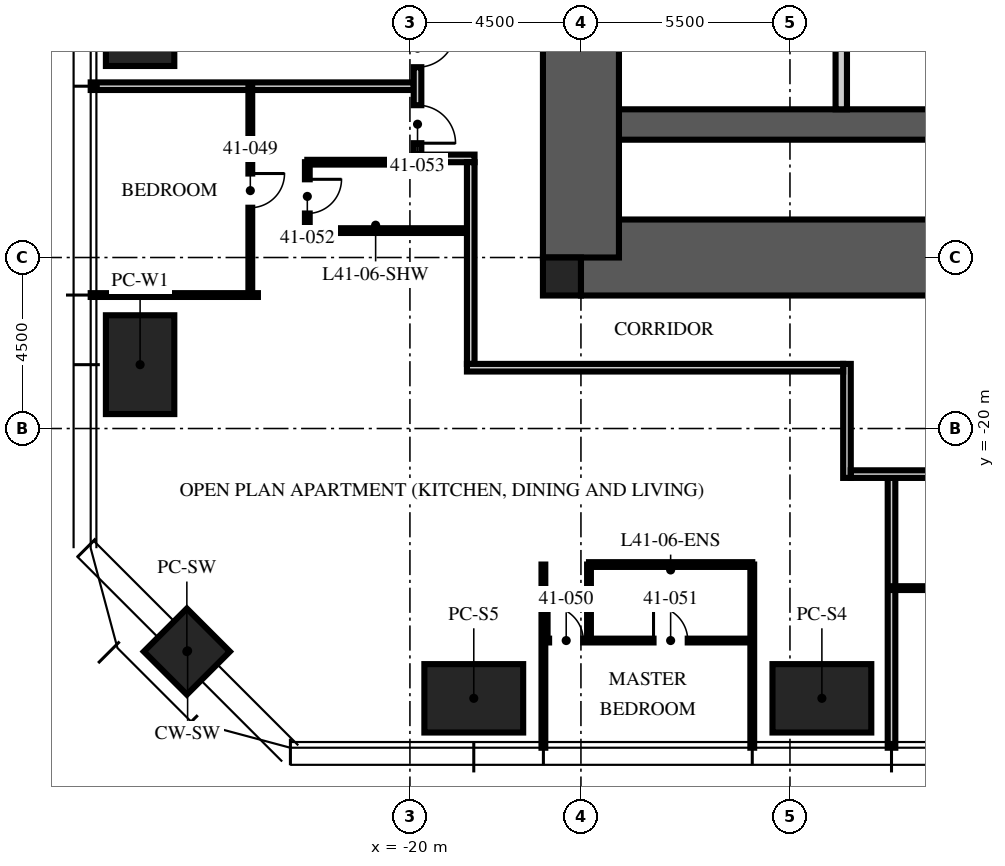
"""IFC4 building model, lengths in metres.
Left out: names, types, materials, properties, quantities, classifications, styles, units other than length and angle.
Written with IfcOpenShell. Run it as: python <this file> out.ifc"""

import sys

from ifc_helpers import new_model, si_unit, direction, frame, frame_2d, origin, origin_2d, place, context, subcontext, project, spatial, rectangle, extrude, element, fill, save


model = new_model("IFC4")
c1 = context("Model", 3, precision=1e-05, world=origin(), true_north=direction((0.0, 1.0)))
c2 = subcontext(c1, "Body", "Model", "MODEL_VIEW")
j1 = project(units=[si_unit("LENGTHUNIT", "METRE"), si_unit("PLANEANGLEUNIT", "RADIAN")], contexts=[c1])
p1 = place(None, origin())
s1 = spatial("IfcSite", under=j1, at=p1, CompositionType="ELEMENT")
p2 = place(p1, origin())
s2 = spatial("IfcBuilding", under=s1, at=p2, CompositionType="ELEMENT")
p3 = place(p2, frame((0.0, 0.0, 163.5)))
s3 = spatial("IfcBuildingStorey", under=s2, at=p3, CompositionType="ELEMENT", Elevation=163.5)
p4 = place(p3, frame((-15.5, -15.5, -0.25), z_axis=(0.0, 0.0, 1.0), x_axis=(1.0, 0.0, 0.0)))
e1 = element("IfcWall", 1, at=p4, inside=s3, PredefinedType="SHEAR", context=c2, shape_type="SweptSolid", body=[
    extrude(rectangle(XDim=31.0, YDim=2.0, at=frame_2d((15.5, 0.0))), origin(), (0.0, 0.0, 1.0), 3.75),
])
p5 = place(p4, frame((10.4, 0.0, 0.25)))
e2 = element("IfcOpeningElement", 2, at=p5, cuts=e1, PredefinedType="OPENING", context=c2, shape_type="SweptSolid", body=[
    extrude(rectangle(XDim=1.1, YDim=2.1, at=frame_2d((0.55, 1.05))), frame((0.0, 1.01, 0.0), z_axis=(0.0, -1.0, 0.0), x_axis=(1.0, 0.0, 0.0)), (0.0, 0.0, 1.0), 2.02),
])
p6 = place(p4, frame((13.5, 0.0, 0.25)))
e3 = element("IfcOpeningElement", 3, at=p6, cuts=e1, PredefinedType="OPENING", context=c2, shape_type="SweptSolid", body=[
    extrude(rectangle(XDim=1.1, YDim=2.1, at=frame_2d((0.55, 1.05))), frame((0.0, 1.01, 0.0), z_axis=(0.0, -1.0, 0.0), x_axis=(1.0, 0.0, 0.0)), (0.0, 0.0, 1.0), 2.02),
])
p7 = place(p4, frame((16.6, 0.0, 0.25)))
e4 = element("IfcOpeningElement", 4, at=p7, cuts=e1, PredefinedType="OPENING", context=c2, shape_type="SweptSolid", body=[
    extrude(rectangle(XDim=1.1, YDim=2.1, at=frame_2d((0.55, 1.05))), frame((0.0, 1.01, 0.0), z_axis=(0.0, -1.0, 0.0), x_axis=(1.0, 0.0, 0.0)), (0.0, 0.0, 1.0), 2.02),
])
p8 = place(p3, frame((-15.5, -12.0, -0.25), z_axis=(0.0, 0.0, 1.0), x_axis=(1.0, 0.0, 0.0)))
e5 = element("IfcWall", 5, at=p8, inside=s3, PredefinedType="SHEAR", context=c2, shape_type="SweptSolid", body=[
    extrude(rectangle(XDim=31.0, YDim=0.8, at=frame_2d((15.5, 0.0))), origin(), (0.0, 0.0, 1.0), 3.75),
])
p9 = place(p3, frame((-15.5, -15.5, -0.25), z_axis=(0.0, 0.0, 1.0), x_axis=(0.0, 1.0, 0.0)))
e6 = element("IfcWall", 6, at=p9, inside=s3, PredefinedType="SHEAR", context=c2, shape_type="SweptSolid", body=[
    extrude(rectangle(XDim=31.0, YDim=2.0, at=frame_2d((15.5, 0.0))), origin(), (0.0, 0.0, 1.0), 3.75),
])
p10 = place(p9, frame((6.5, 0.0, 0.25)))
e7 = element("IfcOpeningElement", 7, at=p10, cuts=e6, PredefinedType="OPENING", context=c2, shape_type="SweptSolid", body=[
    extrude(rectangle(XDim=1.2, YDim=2.1, at=frame_2d((0.6, 1.05))), frame((0.0, 1.01, 0.0), z_axis=(0.0, -1.0, 0.0), x_axis=(1.0, 0.0, 0.0)), (0.0, 0.0, 1.0), 2.02),
])
p11 = place(p9, frame((23.0, 0.0, 0.25)))
e8 = element("IfcOpeningElement", 8, at=p11, cuts=e6, PredefinedType="OPENING", context=c2, shape_type="SweptSolid", body=[
    extrude(rectangle(XDim=1.8, YDim=2.1, at=frame_2d((0.9, 1.05))), frame((0.0, 1.01, 0.0), z_axis=(0.0, -1.0, 0.0), x_axis=(1.0, 0.0, 0.0)), (0.0, 0.0, 1.0), 2.02),
])
p12 = place(p3, frame((-16.0, -16.0, -0.25), z_axis=(0.0, 0.0, 1.0), x_axis=(1.0, 0.0, 0.0)))
e9 = element("IfcColumn", 9, at=p12, inside=s3, PredefinedType="COLUMN", context=c2, shape_type="SweptSolid", body=[
    extrude(rectangle(XDim=1.0, YDim=1.0, at=origin_2d()), origin(), (0.0, 0.0, 1.0), 3.75),
])
for number, where, z_axis, x_axis in (
    (10, (-9.16, -27.1, 0.0), (0.0, 0.0, 1.0), (1.0, 0.0, 0.0)),
    (11, (-18.32, -27.1, 0.0), (0.0, 0.0, 1.0), (1.0, 0.0, 0.0)),
    (12, (-27.1, -18.32, 0.0), (0.0, 0.0, 1.0), (0.0, 1.0, 0.0)),
    (13, (-27.1, -9.16, 0.0), (0.0, 0.0, 1.0), (0.0, 1.0, 0.0)),
):
    element("IfcColumn", number, at=place(p3, frame(where, z_axis=z_axis, x_axis=x_axis)), inside=s3, PredefinedType="COLUMN", context=c2, shape_type="SweptSolid", body=[
        extrude(rectangle(XDim=2.6, YDim=1.8, at=origin_2d()), origin(), (0.0, 0.0, 1.0), 3.75),
    ])
p13 = place(p3, frame((-25.87, -25.87, 0.0), z_axis=(0.0, 0.0, 1.0), x_axis=(0.707106781187, -0.707106781187, 0.0)))
e14 = element("IfcColumn", 14, at=p13, inside=s3, PredefinedType="COLUMN", context=c2, shape_type="SweptSolid", body=[
    extrude(rectangle(XDim=1.6, YDim=1.6, at=origin_2d()), origin(), (0.0, 0.0, 1.0), 3.75),
])
p14 = place(p3, frame((-8.65, -11.6, 0.0), z_axis=(0.0, 0.0, 1.0), x_axis=(0.0, 1.0, 0.0)))
e15 = element("IfcWall", 15, at=p14, inside=s3, PredefinedType="PARTITIONING", context=c2, shape_type="SweptSolid", body=[
    extrude(rectangle(XDim=6.7, YDim=0.3, at=frame_2d((3.35, 0.0))), origin(), (0.0, 0.0, 1.0), 3.5),
])
p15 = place(p14, frame((2.85, 0.0, 0.0)))
e16 = element("IfcOpeningElement", 16, at=p15, cuts=e15, PredefinedType="OPENING", context=c2, shape_type="SweptSolid", body=[
    extrude(rectangle(XDim=1.1, YDim=2.1, at=frame_2d((0.55, 1.05))), frame((0.0, 0.16, 0.0), z_axis=(0.0, -1.0, 0.0), x_axis=(1.0, 0.0, 0.0)), (0.0, 0.0, 1.0), 0.32),
])
p16 = place(p3, frame((-19.9, -10.992, 0.0), z_axis=(0.0, 0.0, 1.0), x_axis=(-1.0, 0.0, 0.0)))
e17 = element("IfcWall", 17, at=p16, inside=s3, PredefinedType="PARTITIONING", context=c2, shape_type="SweptSolid", body=[
    extrude(rectangle(XDim=8.5, YDim=0.2, at=frame_2d((4.25, 0.0))), origin(), (0.0, 0.0, 1.0), 2.81),
])
p17 = place(p3, frame((-24.0, -16.488, 0.0), z_axis=(0.0, 0.0, 1.0), x_axis=(-1.0, 0.0, 0.0)))
e18 = element("IfcWall", 18, at=p17, inside=s3, PredefinedType="PARTITIONING", context=c2, shape_type="SweptSolid", body=[
    extrude(rectangle(XDim=4.4, YDim=0.1, at=frame_2d((2.2, 0.0))), origin(), (0.0, 0.0, 1.0), 2.81),
])
for number, where, z_axis, x_axis in (
    (19, (-16.488, -23.58, 0.0), (0.0, 0.0, 1.0), (0.0, -1.0, 0.0)),
    (20, (-10.992, -23.58, 0.0), (0.0, 0.0, 1.0), (0.0, -1.0, 0.0)),
):
    element("IfcWall", number, at=place(p3, frame(where, z_axis=z_axis, x_axis=x_axis)), inside=s3, PredefinedType="PARTITIONING", context=c2, shape_type="SweptSolid", body=[
        extrude(rectangle(XDim=4.82, YDim=0.1, at=frame_2d((2.41, 0.0))), origin(), (0.0, 0.0, 1.0), 2.81),
    ])
p18 = place(p3, frame((-7.328, -21.3, 0.0), z_axis=(0.0, 0.0, 1.0), x_axis=(0.0, -1.0, 0.0)))
e21 = element("IfcWall", 21, at=p18, inside=s3, PredefinedType="PARTITIONING", context=c2, shape_type="SweptSolid", body=[
    extrude(rectangle(XDim=7.1, YDim=0.2, at=frame_2d((3.55, 0.0))), origin(), (0.0, 0.0, 1.0), 2.81),
])
p19 = place(p3, frame((-24.2, -10.992, 0.0), z_axis=(0.0, 0.0, 1.0), x_axis=(0.0, -1.0, 0.0)))
e22 = element("IfcWall", 22, at=p19, inside=s3, PredefinedType="PARTITIONING", context=c2, shape_type="SweptSolid", body=[
    extrude(rectangle(XDim=5.496, YDim=0.1, at=frame_2d((2.748, 0.0))), origin(), (0.0, 0.0, 1.0), 2.81),
])
p20 = place(p19, frame((2.298, 0.0, 0.0)))
e23 = element("IfcOpeningElement", 23, at=p20, cuts=e22, PredefinedType="OPENING", context=c2, shape_type="SweptSolid", body=[
    extrude(rectangle(XDim=0.9, YDim=2.1, at=frame_2d((0.45, 1.05))), frame((0.0, 0.06, 0.0), z_axis=(0.0, -1.0, 0.0), x_axis=(1.0, 0.0, 0.0)), (0.0, 0.0, 1.0), 0.12),
])
p21 = place(p3, frame((-16.488, -25.58, 0.0), z_axis=(0.0, 0.0, 1.0), x_axis=(1.0, 0.0, 0.0)))
e24 = element("IfcWall", 24, at=p21, inside=s3, PredefinedType="PARTITIONING", context=c2, shape_type="SweptSolid", body=[
    extrude(rectangle(XDim=5.496, YDim=0.1, at=frame_2d((2.748, 0.0))), origin(), (0.0, 0.0, 1.0), 2.81),
])
p22 = place(p21, frame((0.15, 0.0, 0.0)))
e25 = element("IfcOpeningElement", 25, at=p22, cuts=e24, PredefinedType="OPENING", context=c2, shape_type="SweptSolid", body=[
    extrude(rectangle(XDim=0.9, YDim=2.1, at=frame_2d((0.45, 1.05))), frame((0.0, 0.06, 0.0), z_axis=(0.0, -1.0, 0.0), x_axis=(1.0, 0.0, 0.0)), (0.0, 0.0, 1.0), 0.12),
])
p23 = place(p21, frame((2.898, 0.0, 0.0)))
e26 = element("IfcOpeningElement", 26, at=p23, cuts=e24, PredefinedType="OPENING", context=c2, shape_type="SweptSolid", body=[
    extrude(rectangle(XDim=0.9, YDim=2.1, at=frame_2d((0.45, 1.05))), frame((0.0, 0.06, 0.0), z_axis=(0.0, -1.0, 0.0), x_axis=(1.0, 0.0, 0.0)), (0.0, 0.0, 1.0), 0.12),
])
p24 = place(p3, frame((-15.288, -23.58, 0.0), z_axis=(0.0, 0.0, 1.0), x_axis=(0.0, -1.0, 0.0)))
e27 = element("IfcWall", 27, at=p24, inside=s3, PredefinedType="PARTITIONING", context=c2, shape_type="SweptSolid", body=[
    extrude(rectangle(XDim=2.0, YDim=0.1, at=frame_2d((1.0, 0.0))), origin(), (0.0, 0.0, 1.0), 3.5),
])
p25 = place(p3, frame((-15.288, -23.58, 0.0), z_axis=(0.0, 0.0, 1.0), x_axis=(1.0, 0.0, 0.0)))
e28 = element("IfcWall", 28, at=p25, inside=s3, PredefinedType="PARTITIONING", context=c2, shape_type="SweptSolid", body=[
    extrude(rectangle(XDim=4.296, YDim=0.125, at=frame_2d((2.148, 0.0))), origin(), (0.0, 0.0, 1.0), 2.81),
])
p26 = place(p3, frame((-22.7, -12.992, 0.0), z_axis=(0.0, 0.0, 1.0), x_axis=(0.0, -1.0, 0.0)))
e29 = element("IfcWall", 29, at=p26, inside=s3, PredefinedType="PARTITIONING", context=c2, shape_type="SweptSolid", body=[
    extrude(rectangle(XDim=1.8, YDim=0.125, at=frame_2d((0.9, 0.0))), origin(), (0.0, 0.0, 1.0), 2.81),
])
p27 = place(p26, frame((0.45, 0.0, 0.0)))
e30 = element("IfcOpeningElement", 30, at=p27, cuts=e29, PredefinedType="OPENING", context=c2, shape_type="SweptSolid", body=[
    extrude(rectangle(XDim=0.9, YDim=2.1, at=frame_2d((0.45, 1.05))), frame((0.0, 0.073, 0.0), z_axis=(0.0, -1.0, 0.0), x_axis=(1.0, 0.0, 0.0)), (0.0, 0.0, 1.0), 0.145),
])
p28 = place(p3, frame((-19.97, -12.992, 0.0), z_axis=(0.0, 0.0, 1.0), x_axis=(-1.0, 0.0, 0.0)))
e31 = element("IfcWall", 31, at=p28, inside=s3, PredefinedType="PARTITIONING", context=c2, shape_type="SweptSolid", body=[
    extrude(rectangle(XDim=2.73, YDim=0.125, at=frame_2d((1.365, 0.0))), origin(), (0.0, 0.0, 1.0), 3.5),
])
p29 = place(p3, frame((-18.5, -14.792, 0.0), z_axis=(0.0, 0.0, 1.0), x_axis=(-1.0, 0.0, 0.0)))
e32 = element("IfcWall", 32, at=p29, inside=s3, PredefinedType="PARTITIONING", context=c2, shape_type="SweptSolid", body=[
    extrude(rectangle(XDim=4.2, YDim=0.125, at=frame_2d((2.1, 0.0))), origin(), (0.0, 0.0, 1.0), 3.5),
])
p30 = place(p3, frame((-7.328, -24.2, 0.0), z_axis=(0.0, 0.0, 1.0), x_axis=(1.0, 0.0, 0.0)))
e33 = element("IfcWall", 33, at=p30, inside=s3, PredefinedType="PARTITIONING", context=c2, shape_type="SweptSolid", body=[
    extrude(rectangle(XDim=5.496, YDim=0.1, at=frame_2d((2.748, 0.0))), origin(), (0.0, 0.0, 1.0), 2.81),
])
p31 = place(p30, frame((2.298, 0.0, 0.0)))
e34 = element("IfcOpeningElement", 34, at=p31, cuts=e33, PredefinedType="OPENING", context=c2, shape_type="SweptSolid", body=[
    extrude(rectangle(XDim=0.9, YDim=2.1, at=frame_2d((0.45, 1.05))), frame((0.0, 0.06, 0.0), z_axis=(0.0, -1.0, 0.0), x_axis=(1.0, 0.0, 0.0)), (0.0, 0.0, 1.0), 0.12),
])
p32 = place(p3, frame((-18.3, -12.892, 0.0), z_axis=(0.0, 0.0, 1.0), x_axis=(-1.0, 0.0, 0.0)))
e35 = element("IfcWall", 35, at=p32, inside=s3, PredefinedType="PARTITIONING", context=c2, shape_type="SweptSolid", body=[
    extrude(rectangle(XDim=1.6, YDim=0.2, at=frame_2d((0.8, 0.0))), origin(), (0.0, 0.0, 1.0), 3.5),
])
p33 = place(p3, frame((-19.8, -9.192, 0.0), z_axis=(0.0, 0.0, 1.0), x_axis=(0.0, -1.0, 0.0)))
e36 = element("IfcWall", 36, at=p33, inside=s3, PredefinedType="PARTITIONING", context=c2, shape_type="SweptSolid", body=[
    extrude(rectangle(XDim=3.6, YDim=0.2, at=frame_2d((1.8, 0.0))), origin(), (0.0, 0.0, 1.0), 2.7),
])
p34 = place(p33, frame((0.3, 0.0, 0.0)))
e37 = element("IfcOpeningElement", 37, at=p34, cuts=e36, PredefinedType="OPENING", context=c2, shape_type="SweptSolid", body=[
    extrude(rectangle(XDim=1.0, YDim=2.2, at=frame_2d((0.5, 1.1))), frame((0.0, 0.11, 0.0), z_axis=(0.0, -1.0, 0.0), x_axis=(1.0, 0.0, 0.0)), (0.0, 0.0, 1.0), 0.22),
])
p35 = place(p33, frame((2.3, 0.0, 0.0)))
e38 = element("IfcOpeningElement", 38, at=p35, cuts=e36, PredefinedType="OPENING", context=c2, shape_type="SweptSolid", body=[
    extrude(rectangle(XDim=1.0, YDim=2.2, at=frame_2d((0.5, 1.1))), frame((0.0, 0.11, 0.0), z_axis=(0.0, -1.0, 0.0), x_axis=(1.0, 0.0, 0.0)), (0.0, 0.0, 1.0), 0.22),
])
p36 = place(p3, frame((-18.4, -12.992, 0.0), z_axis=(0.0, 0.0, 1.0), x_axis=(0.0, -1.0, 0.0)))
e39 = element("IfcWall", 39, at=p36, inside=s3, PredefinedType="PARTITIONING", context=c2, shape_type="SweptSolid", body=[
    extrude(rectangle(XDim=5.308, YDim=0.2, at=frame_2d((2.654, 0.0))), origin(), (0.0, 0.0, 1.0), 2.3),
])
p37 = place(p3, frame((-8.5, -18.3, 0.0), z_axis=(0.0, 0.0, 1.0), x_axis=(0.0, -1.0, 0.0)))
e40 = element("IfcWall", 40, at=p37, inside=s3, PredefinedType="PARTITIONING", context=c2, shape_type="SweptSolid", body=[
    extrude(rectangle(XDim=3.0, YDim=0.2, at=frame_2d((1.5, 0.0))), origin(), (0.0, 0.0, 1.0), 3.5),
])
p38 = place(p3, frame((5.4, -21.2, 0.0), z_axis=(0.0, 0.0, 1.0), x_axis=(-1.0, 0.0, 0.0)))
e41 = element("IfcWall", 41, at=p38, inside=s3, PredefinedType="PARTITIONING", context=c2, shape_type="SweptSolid", body=[
    extrude(rectangle(XDim=13.8, YDim=0.2, at=frame_2d((6.9, 0.0))), origin(), (0.0, 0.0, 1.0), 2.7),
])
p39 = place(p3, frame((-8.6, -18.4, 0.0), z_axis=(0.0, 0.0, 1.0), x_axis=(-1.0, 0.0, 0.0)))
e42 = element("IfcWall", 42, at=p39, inside=s3, PredefinedType="PARTITIONING", context=c2, shape_type="SweptSolid", body=[
    extrude(rectangle(XDim=9.9, YDim=0.2, at=frame_2d((4.95, 0.0))), origin(), (0.0, 0.0, 1.0), 2.3),
])
p40 = place(p34, origin())
e43 = element("IfcDoor", 43, at=p40, inside=s3, OperationType="SINGLE_SWING_LEFT", PredefinedType="DOOR", context=c2, shape_type="SweptSolid", body=[
    extrude(rectangle(XDim=1.0, YDim=2.2, at=frame_2d((0.5, 1.1))), frame((0.0, 0.025, 0.0), z_axis=(0.0, -1.0, 0.0), x_axis=(1.0, 0.0, 0.0)), (0.0, 0.0, 1.0), 0.05),
])
fill(e37, e43)
p41 = place(p20, origin())
e44 = element("IfcDoor", 44, at=p41, inside=s3, OperationType="SINGLE_SWING_LEFT", PredefinedType="DOOR", context=c2, shape_type="SweptSolid", body=[
    extrude(rectangle(XDim=0.9, YDim=2.1, at=frame_2d((0.45, 1.05))), frame((0.0, 0.025, 0.0), z_axis=(0.0, -1.0, 0.0), x_axis=(1.0, 0.0, 0.0)), (0.0, 0.0, 1.0), 0.05),
])
fill(e23, e44)
p42 = place(p22, origin())
e45 = element("IfcDoor", 45, at=p42, inside=s3, OperationType="SINGLE_SWING_LEFT", PredefinedType="DOOR", context=c2, shape_type="SweptSolid", body=[
    extrude(rectangle(XDim=0.9, YDim=2.1, at=frame_2d((0.45, 1.05))), frame((0.0, 0.025, 0.0), z_axis=(0.0, -1.0, 0.0), x_axis=(1.0, 0.0, 0.0)), (0.0, 0.0, 1.0), 0.05),
])
fill(e25, e45)
p43 = place(p23, origin())
e46 = element("IfcDoor", 46, at=p43, inside=s3, OperationType="SINGLE_SWING_LEFT", PredefinedType="DOOR", context=c2, shape_type="SweptSolid", body=[
    extrude(rectangle(XDim=0.9, YDim=2.1, at=frame_2d((0.45, 1.05))), frame((0.0, 0.025, 0.0), z_axis=(0.0, -1.0, 0.0), x_axis=(1.0, 0.0, 0.0)), (0.0, 0.0, 1.0), 0.05),
])
fill(e26, e46)
p44 = place(p27, origin())
e47 = element("IfcDoor", 47, at=p44, inside=s3, OperationType="SINGLE_SWING_LEFT", PredefinedType="DOOR", context=c2, shape_type="SweptSolid", body=[
    extrude(rectangle(XDim=0.9, YDim=2.1, at=frame_2d((0.45, 1.05))), frame((0.0, 0.025, 0.0), z_axis=(0.0, -1.0, 0.0), x_axis=(1.0, 0.0, 0.0)), (0.0, 0.0, 1.0), 0.05),
])
fill(e30, e47)
p45 = place(p35, origin())
e48 = element("IfcDoor", 48, at=p45, inside=s3, OperationType="SINGLE_SWING_RIGHT", PredefinedType="DOOR", context=c2, shape_type="SweptSolid", body=[
    extrude(rectangle(XDim=1.0, YDim=2.2, at=frame_2d((0.5, 1.1))), frame((0.0, 0.025, 0.0), z_axis=(0.0, -1.0, 0.0), x_axis=(1.0, 0.0, 0.0)), (0.0, 0.0, 1.0), 0.05),
])
fill(e38, e48)
save(model, sys.argv[1])
